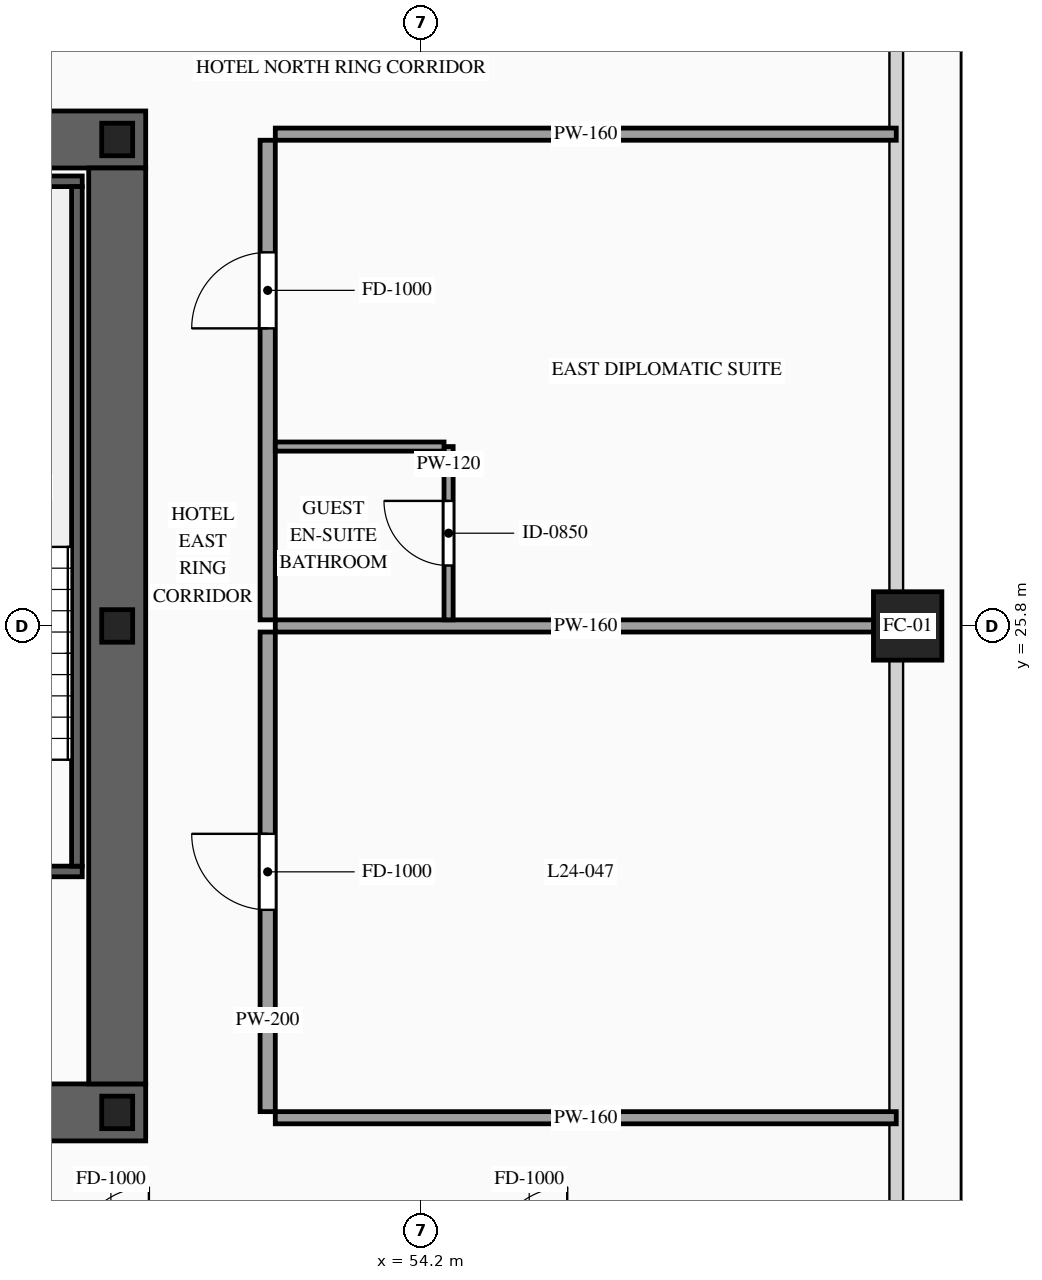
"""IFC4 building model, lengths in metres.
Left out: names, types, materials, properties, quantities, classifications, styles, units other than length and angle.
Written with IfcOpenShell. Run it as: python <this file> out.ifc"""

import sys

from ifc_helpers import new_model, si_unit, direction, frame, frame_2d, origin, origin_2d, place, context, subcontext, project, spatial, rectangle, hollow_rectangle, i_section, extrude, source, transform, mapped, element, fill, save


model = new_model("IFC4")
c1 = context("Model", 3, precision=1e-05, world=origin(), true_north=direction((0.0, 1.0)))
c2 = subcontext(c1, "Body", "Model", "MODEL_VIEW")
j1 = project(units=[si_unit("LENGTHUNIT", "METRE"), si_unit("PLANEANGLEUNIT", "RADIAN")], contexts=[c1])
p1 = place(None, origin())
s1 = spatial("IfcSite", under=j1, at=p1, CompositionType="ELEMENT")
p2 = place(p1, origin())
s2 = spatial("IfcBuilding", under=s1, at=p2, CompositionType="ELEMENT")
p3 = place(p2, frame((0.0, 0.0, 93.8)))
s3 = spatial("IfcBuildingStorey", under=s2, at=p3, CompositionType="ELEMENT", Elevation=93.8)
p4 = place(p3, frame((23.425, 19.4, 0.0), z_axis=(0.0, 0.0, 1.0), x_axis=(1.0, 0.0, 0.0)))
e1 = element("IfcWall", 1, at=p4, inside=s3, PredefinedType="SHEAR", context=c2, shape_type="SweptSolid", body=[
    extrude(rectangle(XDim=27.15, YDim=0.75, at=frame_2d((13.575, 0.0))), origin(), (0.0, 0.0, 1.0), 3.6),
])
p5 = place(p4, frame((2.025, 0.0, 0.0)))
e2 = element("IfcOpeningElement", 2, at=p5, cuts=e1, PredefinedType="OPENING", context=c2, shape_type="SweptSolid", body=[
    extrude(rectangle(XDim=1.1, YDim=2.2, at=frame_2d((0.55, 1.1))), frame((0.0, 0.39, 0.0), z_axis=(0.0, -1.0, 0.0), x_axis=(1.0, 0.0, 0.0)), (0.0, 0.0, 1.0), 0.78),
])
p6 = place(p4, frame((9.925, 0.0, 0.0)))
e3 = element("IfcOpeningElement", 3, at=p6, cuts=e1, PredefinedType="OPENING", context=c2, shape_type="SweptSolid", body=[
    extrude(rectangle(XDim=1.1, YDim=2.2, at=frame_2d((0.55, 1.1))), frame((0.0, 0.39, 0.0), z_axis=(0.0, -1.0, 0.0), x_axis=(1.0, 0.0, 0.0)), (0.0, 0.0, 1.0), 0.78),
])
p7 = place(p4, frame((23.125, 0.0, 0.0)))
e4 = element("IfcOpeningElement", 4, at=p7, cuts=e1, PredefinedType="OPENING", context=c2, shape_type="SweptSolid", body=[
    extrude(rectangle(XDim=1.1, YDim=2.2, at=frame_2d((0.55, 1.1))), frame((0.0, 0.39, 0.0), z_axis=(0.0, -1.0, 0.0), x_axis=(1.0, 0.0, 0.0)), (0.0, 0.0, 1.0), 0.78),
])
p8 = place(p4, frame((19.745, 0.0, 0.0)))
e5 = element("IfcOpeningElement", 5, at=p8, cuts=e1, PredefinedType="OPENING", context=c2, shape_type="SweptSolid", body=[
    extrude(rectangle(XDim=0.9, YDim=2.15, at=frame_2d((0.45, 1.075))), frame((0.0, 0.39, 0.0), z_axis=(0.0, -1.0, 0.0), x_axis=(1.0, 0.0, 0.0)), (0.0, 0.0, 1.0), 0.78),
])
p9 = place(p4, frame((18.305, 0.0, 0.0)))
e6 = element("IfcOpeningElement", 6, at=p9, cuts=e1, PredefinedType="OPENING", context=c2, shape_type="SweptSolid", body=[
    extrude(rectangle(XDim=0.9, YDim=2.15, at=frame_2d((0.45, 1.075))), frame((0.0, 0.39, 0.0), z_axis=(0.0, -1.0, 0.0), x_axis=(1.0, 0.0, 0.0)), (0.0, 0.0, 1.0), 0.78),
])
p10 = place(p3, frame((23.425, 32.2, 0.0), z_axis=(0.0, 0.0, 1.0), x_axis=(1.0, 0.0, 0.0)))
e7 = element("IfcWall", 7, at=p10, inside=s3, PredefinedType="SHEAR", context=c2, shape_type="SweptSolid", body=[
    extrude(rectangle(XDim=27.15, YDim=0.75, at=frame_2d((13.575, 0.0))), origin(), (0.0, 0.0, 1.0), 3.6),
])
p11 = place(p10, frame((4.645, 0.0, 0.0)))
e8 = element("IfcOpeningElement", 8, at=p11, cuts=e7, PredefinedType="OPENING", context=c2, shape_type="SweptSolid", body=[
    extrude(rectangle(XDim=0.9, YDim=2.15, at=frame_2d((0.45, 1.075))), frame((0.0, 0.39, 0.0), z_axis=(0.0, -1.0, 0.0), x_axis=(1.0, 0.0, 0.0)), (0.0, 0.0, 1.0), 0.78),
])
p12 = place(p10, frame((9.925, 0.0, 0.0)))
e9 = element("IfcOpeningElement", 9, at=p12, cuts=e7, PredefinedType="OPENING", context=c2, shape_type="SweptSolid", body=[
    extrude(rectangle(XDim=1.1, YDim=2.2, at=frame_2d((0.55, 1.1))), frame((0.0, 0.39, 0.0), z_axis=(0.0, -1.0, 0.0), x_axis=(1.0, 0.0, 0.0)), (0.0, 0.0, 1.0), 0.78),
])
p13 = place(p10, frame((15.775, 0.0, 0.0)))
e10 = element("IfcOpeningElement", 10, at=p13, cuts=e7, PredefinedType="OPENING", context=c2, shape_type="SweptSolid", body=[
    extrude(rectangle(XDim=1.1, YDim=2.2, at=frame_2d((0.55, 1.1))), frame((0.0, 0.39, 0.0), z_axis=(0.0, -1.0, 0.0), x_axis=(1.0, 0.0, 0.0)), (0.0, 0.0, 1.0), 0.78),
])
p14 = place(p10, frame((18.975, 0.0, 0.0)))
e11 = element("IfcOpeningElement", 11, at=p14, cuts=e7, PredefinedType="OPENING", context=c2, shape_type="SweptSolid", body=[
    extrude(rectangle(XDim=0.9, YDim=2.15, at=frame_2d((0.45, 1.075))), frame((0.0, 0.39, 0.0), z_axis=(0.0, -1.0, 0.0), x_axis=(1.0, 0.0, 0.0)), (0.0, 0.0, 1.0), 0.78),
])
m1 = source(origin(), c2, "Body", "SweptSolid", [
    extrude(rectangle(XDim=12.05, YDim=0.75, at=frame_2d((6.025, 0.0))), origin(), (0.0, 0.0, 1.0), 3.6),
])
p15 = place(p3, frame((50.2, 19.775, 0.0), z_axis=(0.0, 0.0, 1.0), x_axis=(0.0, 1.0, 0.0)))
e12 = element("IfcWall", 12, at=p15, inside=s3, PredefinedType="SHEAR", context=c2, shape_type="MappedRepresentation", body=[
    mapped(m1, transform((0.0, 0.0, 0.0), scale=1.0)),
])
m2 = source(origin(), c2, "Body", "SweptSolid", [
    extrude(i_section(OverallWidth=0.407, OverallDepth=0.428, WebThickness=0.02, FlangeThickness=0.035, at=origin_2d()), origin(), (0.0, 0.0, 1.0), 3.6),
])
for number, where, z_axis, x_axis in (
    (13, (50.2, 19.4, 0.0), (0.0, 0.0, 1.0), (1.0, 0.0, 0.0)),
    (14, (50.2, 25.8, 0.0), (0.0, 0.0, 1.0), (1.0, 0.0, 0.0)),
    (15, (50.2, 32.2, 0.0), (0.0, 0.0, 1.0), (1.0, 0.0, 0.0)),
):
    element("IfcColumn", number, at=place(p3, frame(where, z_axis=z_axis, x_axis=x_axis)), inside=s3, PredefinedType="COLUMN", context=c2, shape_type="MappedRepresentation", body=[
        mapped(m2, transform((0.0, 0.0, 0.0), scale=1.0)),
    ])
m3 = source(origin(), c2, "Body", "SweptSolid", [
    extrude(hollow_rectangle(XDim=0.9, YDim=0.9, WallThickness=0.042, at=origin_2d()), origin(), (0.0, 0.0, 1.0), 3.6),
])
p16 = place(p3, frame((60.6, 25.8, 0.0), z_axis=(0.0, 0.0, 1.0), x_axis=(1.0, 0.0, 0.0)))
e16 = element("IfcColumn", 16, at=p16, inside=s3, PredefinedType="COLUMN", context=c2, shape_type="MappedRepresentation", body=[
    mapped(m3, transform((0.0, 0.0, 0.0), scale=1.0)),
])
p17 = place(p3, frame((46.46, 22.57, 0.0), z_axis=(0.0, 0.0, 1.0), x_axis=(1.0, 0.0, 0.0)))
e17 = element("IfcWall", 17, at=p17, inside=s3, PredefinedType="SOLIDWALL", context=c2, shape_type="SweptSolid", body=[
    extrude(rectangle(XDim=3.28, YDim=0.14, at=frame_2d((1.64, 0.0))), origin(), (0.0, 0.0, 1.0), 3.38),
])
p18 = place(p17, frame((1.09, 0.0, 0.0)))
e18 = element("IfcOpeningElement", 18, at=p18, cuts=e17, PredefinedType="OPENING", context=c2, shape_type="SweptSolid", body=[
    extrude(rectangle(XDim=1.1, YDim=2.2, at=frame_2d((0.55, 1.1))), frame((0.0, 0.085, 0.0), z_axis=(0.0, -1.0, 0.0), x_axis=(1.0, 0.0, 0.0)), (0.0, 0.0, 1.0), 0.17),
])
m4 = source(origin(), c2, "Body", "SweptSolid", [
    extrude(rectangle(XDim=3.28, YDim=0.14, at=frame_2d((1.64, 0.0))), origin(), (0.0, 0.0, 1.0), 3.38),
])
p19 = place(p3, frame((46.46, 31.65, 0.0), z_axis=(0.0, 0.0, 1.0), x_axis=(1.0, 0.0, 0.0)))
e19 = element("IfcWall", 19, at=p19, inside=s3, PredefinedType="SOLIDWALL", context=c2, shape_type="MappedRepresentation", body=[
    mapped(m4, transform((0.0, 0.0, 0.0), scale=1.0)),
])
m5 = source(origin(), c2, "Body", "SweptSolid", [
    extrude(rectangle(XDim=8.94, YDim=0.14, at=frame_2d((4.47, 0.0))), origin(), (0.0, 0.0, 1.0), 3.38),
])
p20 = place(p3, frame((49.67, 22.64, 0.0), z_axis=(0.0, 0.0, 1.0), x_axis=(0.0, 1.0, 0.0)))
e20 = element("IfcWall", 20, at=p20, inside=s3, PredefinedType="SOLIDWALL", context=c2, shape_type="MappedRepresentation", body=[
    mapped(m5, transform((0.0, 0.0, 0.0), scale=1.0)),
])
p21 = place(p3, frame((52.18, 19.41, 0.0), z_axis=(0.0, 0.0, 1.0), x_axis=(0.0, 1.0, 0.0)))
e21 = element("IfcWall", 21, at=p21, inside=s3, PredefinedType="PARTITIONING", context=c2, shape_type="SweptSolid", body=[
    extrude(rectangle(XDim=6.31, YDim=0.2, at=frame_2d((3.155, 0.0))), origin(), (0.0, 0.0, 1.0), 3.38),
])
p22 = place(p21, frame((2.655, 0.0, 0.0)))
e22 = element("IfcOpeningElement", 22, at=p22, cuts=e21, PredefinedType="OPENING", context=c2, shape_type="SweptSolid", body=[
    extrude(rectangle(XDim=1.0, YDim=2.2, at=frame_2d((0.5, 1.1))), frame((0.0, 0.115, 0.0), z_axis=(0.0, -1.0, 0.0), x_axis=(1.0, 0.0, 0.0)), (0.0, 0.0, 1.0), 0.23),
])
m6 = source(origin(), c2, "Body", "SweptSolid", [
    extrude(rectangle(XDim=8.17, YDim=0.16, at=frame_2d((4.085, 0.0))), origin(), (0.0, 0.0, 1.0), 2.675),
])
p23 = place(p3, frame((52.28, 25.8, 0.0), z_axis=(0.0, 0.0, 1.0), x_axis=(1.0, 0.0, 0.0)))
e23 = element("IfcWall", 23, at=p23, inside=s3, PredefinedType="PARTITIONING", context=c2, shape_type="MappedRepresentation", body=[
    mapped(m6, transform((0.0, 0.0, 0.0), scale=1.0)),
])
m7 = source(origin(), c2, "Body", "SweptSolid", [
    extrude(rectangle(XDim=8.17, YDim=0.16, at=frame_2d((4.085, 0.0))), origin(), (0.0, 0.0, 1.0), 2.875),
])
p24 = place(p3, frame((52.28, 19.33, 0.0), z_axis=(0.0, 0.0, 1.0), x_axis=(1.0, 0.0, 0.0)))
e24 = element("IfcWall", 24, at=p24, inside=s3, PredefinedType="PARTITIONING", context=c2, shape_type="MappedRepresentation", body=[
    mapped(m7, transform((0.0, 0.0, 0.0), scale=1.0)),
])
p25 = place(p3, frame((52.18, 25.88, 0.0), z_axis=(0.0, 0.0, 1.0), x_axis=(0.0, 1.0, 0.0)))
e25 = element("IfcWall", 25, at=p25, inside=s3, PredefinedType="PARTITIONING", context=c2, shape_type="SweptSolid", body=[
    extrude(rectangle(XDim=6.31, YDim=0.2, at=frame_2d((3.155, 0.0))), origin(), (0.0, 0.0, 1.0), 3.38),
])
p26 = place(p25, frame((3.835, 0.0, 0.0)))
e26 = element("IfcOpeningElement", 26, at=p26, cuts=e25, PredefinedType="OPENING", context=c2, shape_type="SweptSolid", body=[
    extrude(rectangle(XDim=1.0, YDim=2.2, at=frame_2d((0.5, 1.1))), frame((0.0, 0.115, 0.0), z_axis=(0.0, -1.0, 0.0), x_axis=(1.0, 0.0, 0.0)), (0.0, 0.0, 1.0), 0.23),
])
p27 = place(p3, frame((52.28, 32.27, 0.0), z_axis=(0.0, 0.0, 1.0), x_axis=(1.0, 0.0, 0.0)))
e27 = element("IfcWall", 27, at=p27, inside=s3, PredefinedType="PARTITIONING", context=c2, shape_type="MappedRepresentation", body=[
    mapped(m7, transform((0.0, 0.0, 0.0), scale=1.0)),
])
p28 = place(p3, frame((54.56, 25.88, 0.0), z_axis=(0.0, 0.0, 1.0), x_axis=(0.0, 1.0, 0.0)))
e28 = element("IfcWall", 28, at=p28, inside=s3, PredefinedType="PARTITIONING", context=c2, shape_type="SweptSolid", body=[
    extrude(rectangle(XDim=2.28, YDim=0.12, at=frame_2d((1.14, 0.0))), origin(), (0.0, 0.0, 1.0), 3.38),
])
p29 = place(p28, frame((0.715, 0.0, 0.0)))
e29 = element("IfcOpeningElement", 29, at=p29, cuts=e28, PredefinedType="OPENING", context=c2, shape_type="SweptSolid", body=[
    extrude(rectangle(XDim=0.85, YDim=2.1, at=frame_2d((0.425, 1.05))), frame((0.0, 0.075, 0.0), z_axis=(0.0, -1.0, 0.0), x_axis=(1.0, 0.0, 0.0)), (0.0, 0.0, 1.0), 0.15),
])
m8 = source(origin(), c2, "Body", "SweptSolid", [
    extrude(rectangle(XDim=2.22, YDim=0.12, at=frame_2d((1.11, 0.0))), origin(), (0.0, 0.0, 1.0), 3.38),
])
p30 = place(p3, frame((52.28, 28.16, 0.0), z_axis=(0.0, 0.0, 1.0), x_axis=(1.0, 0.0, 0.0)))
e30 = element("IfcWall", 30, at=p30, inside=s3, PredefinedType="PARTITIONING", context=c2, shape_type="MappedRepresentation", body=[
    mapped(m8, transform((0.0, 0.0, 0.0), scale=1.0)),
])
m9 = source(origin(), c2, "Body", "SweptSolid", [
    extrude(rectangle(XDim=1.0, YDim=2.2, at=frame_2d((0.5, 1.1))), frame((0.0, 0.025, 0.0), z_axis=(0.0, -1.0, 0.0), x_axis=(1.0, 0.0, 0.0)), (0.0, 0.0, 1.0), 0.05),
])
p31 = place(p22, origin())
e31 = element("IfcDoor", 31, at=p31, inside=s3, OperationType="SINGLE_SWING_RIGHT", PredefinedType="DOOR", context=c2, shape_type="MappedRepresentation", body=[
    mapped(m9, transform((0.0, 0.0, 0.0), scale=1.0)),
])
fill(e22, e31)
p32 = place(p26, origin())
e32 = element("IfcDoor", 32, at=p32, inside=s3, OperationType="SINGLE_SWING_LEFT", PredefinedType="DOOR", context=c2, shape_type="MappedRepresentation", body=[
    mapped(m9, transform((0.0, 0.0, 0.0), scale=1.0)),
])
fill(e26, e32)
m10 = source(origin(), c2, "Body", "SweptSolid", [
    extrude(rectangle(XDim=0.85, YDim=2.1, at=frame_2d((0.425, 1.05))), frame((0.0, 0.025, 0.0), z_axis=(0.0, -1.0, 0.0), x_axis=(1.0, 0.0, 0.0)), (0.0, 0.0, 1.0), 0.05),
])
p33 = place(p29, origin())
e33 = element("IfcDoor", 33, at=p33, inside=s3, OperationType="SINGLE_SWING_RIGHT", PredefinedType="DOOR", context=c2, shape_type="MappedRepresentation", body=[
    mapped(m10, transform((0.0, 0.0, 0.0), scale=1.0)),
])
fill(e29, e33)
save(model, sys.argv[1])
